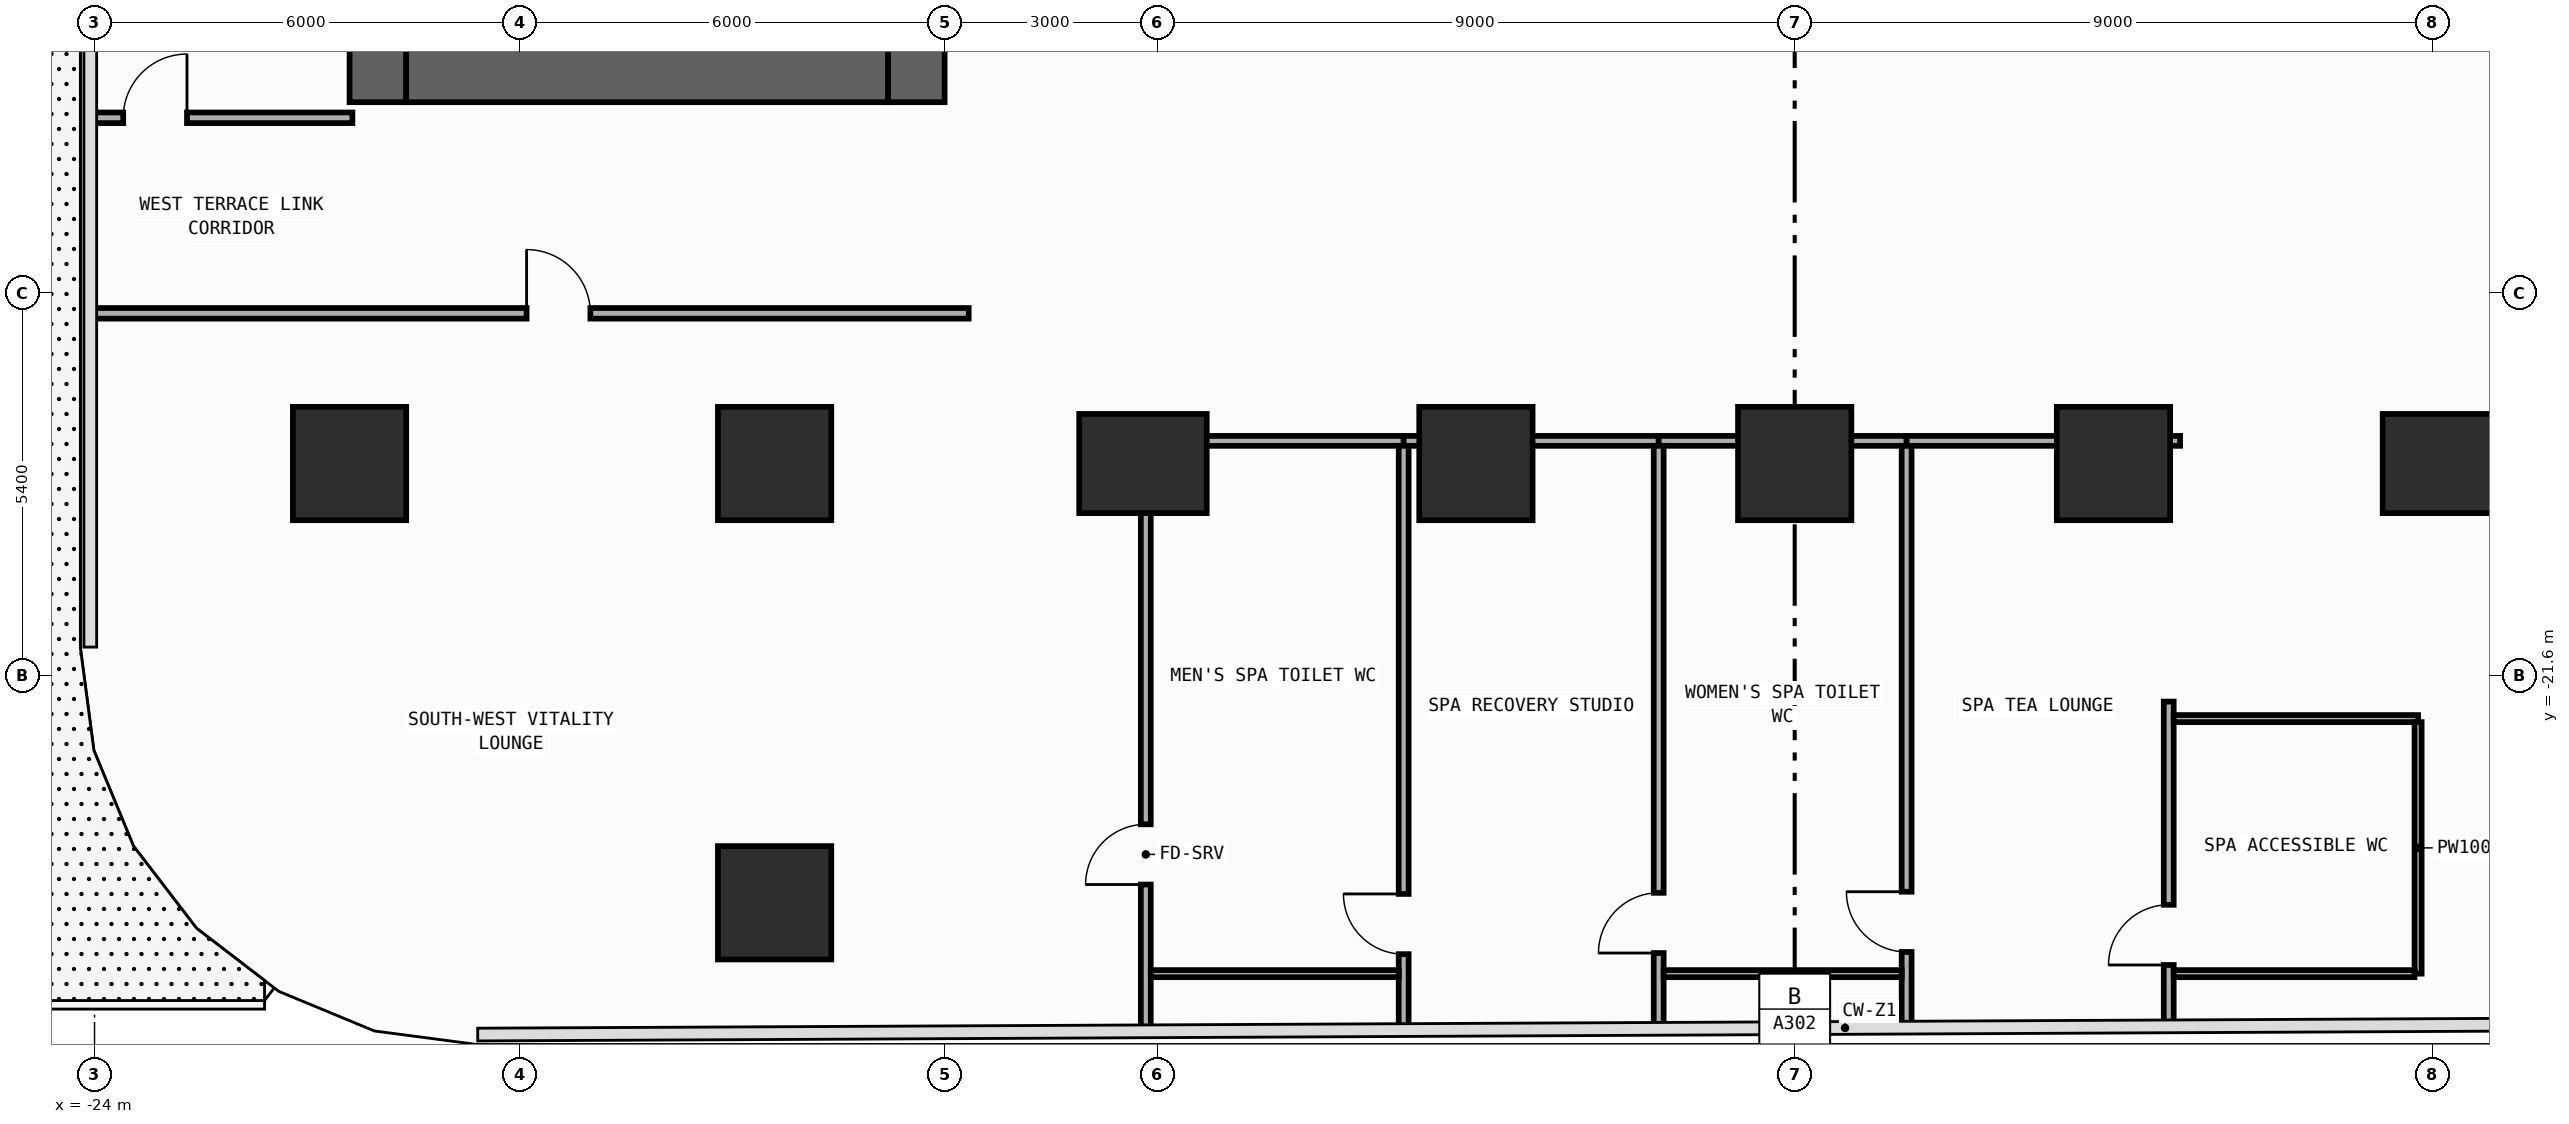
"""IFC4 building model, lengths in metres.
Left out: names, types, materials, properties, quantities, classifications, styles, units other than length and angle.
Written with IfcOpenShell. Run it as: python <this file> out.ifc"""

import sys

from ifc_helpers import new_model, si_unit, direction, frame, frame_2d, origin, origin_2d, place, context, subcontext, project, spatial, rectangle, extrude, element, fill, save


model = new_model("IFC4")
c1 = context("Model", 3, precision=1e-05, world=origin(), true_north=direction((0.0, 1.0)))
c2 = subcontext(c1, "Body", "Model", "MODEL_VIEW")
j1 = project(units=[si_unit("LENGTHUNIT", "METRE"), si_unit("PLANEANGLEUNIT", "RADIAN")], contexts=[c1])
p1 = place(None, origin())
s1 = spatial("IfcSite", under=j1, at=p1, CompositionType="ELEMENT")
p2 = place(p1, origin())
s2 = spatial("IfcBuilding", under=s1, at=p2, CompositionType="ELEMENT")
p3 = place(p2, frame((0.0, 0.0, 21.0)))
s3 = spatial("IfcBuildingStorey", under=s2, at=p3, CompositionType="ELEMENT", Elevation=21.0)
p4 = place(p3, frame((-20.0, -13.5, 0.0), z_axis=(0.0, 0.0, 1.0), x_axis=(0.0, 1.0, 0.0)))
e1 = element("IfcWall", 1, at=p4, inside=s3, PredefinedType="SHEAR", context=c2, shape_type="SweptSolid", body=[
    extrude(rectangle(XDim=27.0, YDim=0.8, at=frame_2d((13.5, 0.0))), origin(), (0.0, 0.0, 1.0), 4.74),
])
p5 = place(p3, frame((-12.4, -13.5, 0.0), z_axis=(0.0, 0.0, 1.0), x_axis=(0.0, 1.0, 0.0)))
e2 = element("IfcWall", 2, at=p5, inside=s3, PredefinedType="SHEAR", context=c2, shape_type="SweptSolid", body=[
    extrude(rectangle(XDim=27.0, YDim=0.8, at=frame_2d((13.5, 0.0))), origin(), (0.0, 0.0, 1.0), 4.74),
])
p6 = place(p5, frame((21.55, 0.0, 0.0)))
e3 = element("IfcOpeningElement", 3, at=p6, cuts=e2, PredefinedType="OPENING", context=c2, shape_type="SweptSolid", body=[
    extrude(rectangle(XDim=1.1, YDim=2.2, at=frame_2d((0.55, 1.1))), frame((0.0, 0.41, 0.0), z_axis=(0.0, -1.0, 0.0), x_axis=(1.0, 0.0, 0.0)), (0.0, 0.0, 1.0), 0.82),
])
p7 = place(p5, frame((18.35, 0.0, 0.0)))
e4 = element("IfcOpeningElement", 4, at=p7, cuts=e2, PredefinedType="OPENING", context=c2, shape_type="SweptSolid", body=[
    extrude(rectangle(XDim=1.1, YDim=2.2, at=frame_2d((0.55, 1.1))), frame((0.0, 0.41, 0.0), z_axis=(0.0, -1.0, 0.0), x_axis=(1.0, 0.0, 0.0)), (0.0, 0.0, 1.0), 0.82),
])
p8 = place(p5, frame((15.15, 0.0, 0.0)))
e5 = element("IfcOpeningElement", 5, at=p8, cuts=e2, PredefinedType="OPENING", context=c2, shape_type="SweptSolid", body=[
    extrude(rectangle(XDim=1.1, YDim=2.2, at=frame_2d((0.55, 1.1))), frame((0.0, 0.41, 0.0), z_axis=(0.0, -1.0, 0.0), x_axis=(1.0, 0.0, 0.0)), (0.0, 0.0, 1.0), 0.82),
])
p9 = place(p5, frame((10.35, 0.0, 0.0)))
e6 = element("IfcOpeningElement", 6, at=p9, cuts=e2, PredefinedType="OPENING", context=c2, shape_type="SweptSolid", body=[
    extrude(rectangle(XDim=1.1, YDim=2.2, at=frame_2d((0.55, 1.1))), frame((0.0, 0.41, 0.0), z_axis=(0.0, -1.0, 0.0), x_axis=(1.0, 0.0, 0.0)), (0.0, 0.0, 1.0), 0.82),
])
p10 = place(p5, frame((7.15, 0.0, 0.0)))
e7 = element("IfcOpeningElement", 7, at=p10, cuts=e2, PredefinedType="OPENING", context=c2, shape_type="SweptSolid", body=[
    extrude(rectangle(XDim=1.1, YDim=2.2, at=frame_2d((0.55, 1.1))), frame((0.0, 0.41, 0.0), z_axis=(0.0, -1.0, 0.0), x_axis=(1.0, 0.0, 0.0)), (0.0, 0.0, 1.0), 0.82),
])
p11 = place(p5, frame((3.95, 0.0, 0.0)))
e8 = element("IfcOpeningElement", 8, at=p11, cuts=e2, PredefinedType="OPENING", context=c2, shape_type="SweptSolid", body=[
    extrude(rectangle(XDim=1.1, YDim=2.2, at=frame_2d((0.55, 1.1))), frame((0.0, 0.41, 0.0), z_axis=(0.0, -1.0, 0.0), x_axis=(1.0, 0.0, 0.0)), (0.0, 0.0, 1.0), 0.82),
])
p12 = place(p5, frame((12.725, 0.0, 0.0)))
e9 = element("IfcOpeningElement", 9, at=p12, cuts=e2, PredefinedType="OPENING", context=c2, shape_type="SweptSolid", body=[
    extrude(rectangle(XDim=1.15, YDim=2.2, at=frame_2d((0.575, 1.1))), frame((0.0, 0.41, 0.0), z_axis=(0.0, -1.0, 0.0), x_axis=(1.0, 0.0, 0.0)), (0.0, 0.0, 1.0), 0.82),
])
p13 = place(p5, frame((1.625, 0.0, 0.0)))
e10 = element("IfcOpeningElement", 10, at=p13, cuts=e2, PredefinedType="OPENING", context=c2, shape_type="SweptSolid", body=[
    extrude(rectangle(XDim=0.85, YDim=2.1, at=frame_2d((0.425, 1.05))), frame((0.0, 0.41, 0.0), z_axis=(0.0, -1.0, 0.0), x_axis=(1.0, 0.0, 0.0)), (0.0, 0.0, 1.0), 0.82),
])
p14 = place(p3, frame((-19.6, -13.1, 0.0), z_axis=(0.0, 0.0, 1.0), x_axis=(1.0, 0.0, 0.0)))
e11 = element("IfcWall", 11, at=p14, inside=s3, PredefinedType="SHEAR", context=c2, shape_type="SweptSolid", body=[
    extrude(rectangle(XDim=6.8, YDim=0.8, at=frame_2d((3.4, 0.0))), origin(), (0.0, 0.0, 1.0), 4.74),
])
for number, where, z_axis, x_axis in (
    (12, (-9.2, -18.6, 0.0), (0.0, 0.0, 1.0), (1.0, 0.0, 0.0)),
    (13, (9.2, -18.6, 0.0), (0.0, 0.0, 1.0), (1.0, 0.0, 0.0)),
):
    element("IfcColumn", number, at=place(p3, frame(where, z_axis=z_axis, x_axis=x_axis)), inside=s3, PredefinedType="COLUMN", context=c2, shape_type="SweptSolid", body=[
        extrude(rectangle(XDim=1.8, YDim=1.4, at=origin_2d()), origin(), (0.0, 0.0, 1.0), 5.0),
    ])
for number, where, z_axis, x_axis in (
    (14, (-20.4, -18.6, 0.0), (0.0, 0.0, 1.0), (1.0, 0.0, 0.0)),
    (15, (-14.4, -18.6, 0.0), (0.0, 0.0, 1.0), (1.0, 0.0, 0.0)),
    (16, (-4.5, -18.6, 0.0), (0.0, 0.0, 1.0), (1.0, 0.0, 0.0)),
    (17, (0.0, -18.6, 0.0), (0.0, 0.0, 1.0), (1.0, 0.0, 0.0)),
    (18, (4.5, -18.6, 0.0), (0.0, 0.0, 1.0), (1.0, 0.0, 0.0)),
    (19, (-14.4, -24.8, 0.0), (0.0, 0.0, 1.0), (1.0, 0.0, 0.0)),
):
    element("IfcColumn", number, at=place(p3, frame(where, z_axis=z_axis, x_axis=x_axis)), inside=s3, PredefinedType="COLUMN", context=c2, shape_type="SweptSolid", body=[
        extrude(rectangle(XDim=1.6, YDim=1.6, at=origin_2d()), origin(), (0.0, 0.0, 1.0), 5.0),
    ])
p15 = place(p3, frame((-24.055, -13.72, 0.0), z_axis=(0.0, 0.0, 1.0), x_axis=(1.0, 0.0, 0.0)))
e20 = element("IfcWall", 20, at=p15, inside=s3, PredefinedType="PARTITIONING", context=c2, shape_type="SweptSolid", body=[
    extrude(rectangle(XDim=3.695, YDim=0.15, at=frame_2d((1.847, 0.0))), origin(), (0.0, 0.0, 1.0), 4.74),
])
p16 = place(p15, frame((0.46, 0.0, 0.0)))
e21 = element("IfcOpeningElement", 21, at=p16, cuts=e20, PredefinedType="OPENING", context=c2, shape_type="SweptSolid", body=[
    extrude(rectangle(XDim=0.9, YDim=2.15, at=frame_2d((0.45, 1.075))), frame((0.0, 0.085, 0.0), z_axis=(0.0, -1.0, 0.0), x_axis=(1.0, 0.0, 0.0)), (0.0, 0.0, 1.0), 0.17),
])
p17 = place(p3, frame((-24.055, -16.48, 0.0), z_axis=(0.0, 0.0, 1.0), x_axis=(1.0, 0.0, 0.0)))
e22 = element("IfcWall", 22, at=p17, inside=s3, PredefinedType="PARTITIONING", context=c2, shape_type="SweptSolid", body=[
    extrude(rectangle(XDim=12.395, YDim=0.15, at=frame_2d((6.198, 0.0))), origin(), (0.0, 0.0, 1.0), 4.74),
])
p18 = place(p17, frame((6.154, 0.0, 0.0)))
e23 = element("IfcOpeningElement", 23, at=p18, cuts=e22, PredefinedType="OPENING", context=c2, shape_type="SweptSolid", body=[
    extrude(rectangle(XDim=0.9, YDim=2.15, at=frame_2d((0.45, 1.075))), frame((0.0, 0.085, 0.0), z_axis=(0.0, -1.0, 0.0), x_axis=(1.0, 0.0, 0.0)), (0.0, 0.0, 1.0), 0.17),
])
p19 = place(p3, frame((-9.16, -26.609, 0.0), z_axis=(0.0, 0.0, 1.0), x_axis=(0.0, 1.0, 0.0)))
e24 = element("IfcWall", 24, at=p19, inside=s3, PredefinedType="PARTITIONING", context=c2, shape_type="SweptSolid", body=[
    extrude(rectangle(XDim=8.399, YDim=0.14, at=frame_2d((4.2, 0.0))), origin(), (0.0, 0.0, 1.0), 3.94),
])
p20 = place(p19, frame((2.067, 0.0, 0.0)))
e25 = element("IfcOpeningElement", 25, at=p20, cuts=e24, PredefinedType="OPENING", context=c2, shape_type="SweptSolid", body=[
    extrude(rectangle(XDim=0.85, YDim=2.1, at=frame_2d((0.425, 1.05))), frame((0.0, 0.08, 0.0), z_axis=(0.0, -1.0, 0.0), x_axis=(1.0, 0.0, 0.0)), (0.0, 0.0, 1.0), 0.16),
])
p21 = place(p3, frame((-9.09, -18.28, 0.0), z_axis=(0.0, 0.0, 1.0), x_axis=(1.0, 0.0, 0.0)))
e26 = element("IfcWall", 26, at=p21, inside=s3, PredefinedType="PARTITIONING", context=c2, shape_type="SweptSolid", body=[
    extrude(rectangle(XDim=3.57, YDim=0.14, at=frame_2d((1.785, 0.0))), origin(), (0.0, 0.0, 1.0), 3.94),
])
p22 = place(p3, frame((-5.52, -18.28, 0.0), z_axis=(0.0, 0.0, 1.0), x_axis=(1.0, 0.0, 0.0)))
e27 = element("IfcWall", 27, at=p22, inside=s3, PredefinedType="PARTITIONING", context=c2, shape_type="SweptSolid", body=[
    extrude(rectangle(XDim=3.6, YDim=0.14, at=frame_2d((1.8, 0.0))), origin(), (0.0, 0.0, 1.0), 3.94),
])
p23 = place(p3, frame((-1.92, -18.28, 0.0), z_axis=(0.0, 0.0, 1.0), x_axis=(1.0, 0.0, 0.0)))
e28 = element("IfcWall", 28, at=p23, inside=s3, PredefinedType="PARTITIONING", context=c2, shape_type="SweptSolid", body=[
    extrude(rectangle(XDim=3.5, YDim=0.14, at=frame_2d((1.75, 0.0))), origin(), (0.0, 0.0, 1.0), 3.94),
])
p24 = place(p3, frame((1.58, -18.28, 0.0), z_axis=(0.0, 0.0, 1.0), x_axis=(1.0, 0.0, 0.0)))
e29 = element("IfcWall", 29, at=p24, inside=s3, PredefinedType="PARTITIONING", context=c2, shape_type="SweptSolid", body=[
    extrude(rectangle(XDim=3.86, YDim=0.14, at=frame_2d((1.93, 0.0))), origin(), (0.0, 0.0, 1.0), 3.94),
])
p25 = place(p3, frame((-5.52, -26.592, 0.0), z_axis=(0.0, 0.0, 1.0), x_axis=(0.0, 1.0, 0.0)))
e30 = element("IfcWall", 30, at=p25, inside=s3, PredefinedType="PARTITIONING", context=c2, shape_type="SweptSolid", body=[
    extrude(rectangle(XDim=8.241, YDim=0.14, at=frame_2d((4.121, 0.0))), origin(), (0.0, 0.0, 1.0), 4.74),
])
p26 = place(p25, frame((1.067, 0.0, 0.0)))
e31 = element("IfcOpeningElement", 31, at=p26, cuts=e30, PredefinedType="OPENING", context=c2, shape_type="SweptSolid", body=[
    extrude(rectangle(XDim=0.85, YDim=2.1, at=frame_2d((0.425, 1.05))), frame((0.0, 0.08, 0.0), z_axis=(0.0, -1.0, 0.0), x_axis=(1.0, 0.0, 0.0)), (0.0, 0.0, 1.0), 0.16),
])
p27 = place(p3, frame((-1.92, -26.574, 0.0), z_axis=(0.0, 0.0, 1.0), x_axis=(0.0, 1.0, 0.0)))
e32 = element("IfcWall", 32, at=p27, inside=s3, PredefinedType="PARTITIONING", context=c2, shape_type="SweptSolid", body=[
    extrude(rectangle(XDim=8.224, YDim=0.14, at=frame_2d((4.112, 0.0))), origin(), (0.0, 0.0, 1.0), 4.74),
])
p28 = place(p27, frame((1.065, 0.0, 0.0)))
e33 = element("IfcOpeningElement", 33, at=p28, cuts=e32, PredefinedType="OPENING", context=c2, shape_type="SweptSolid", body=[
    extrude(rectangle(XDim=0.85, YDim=2.1, at=frame_2d((0.425, 1.05))), frame((0.0, 0.08, 0.0), z_axis=(0.0, -1.0, 0.0), x_axis=(1.0, 0.0, 0.0)), (0.0, 0.0, 1.0), 0.16),
])
p29 = place(p3, frame((1.58, -26.557, 0.0), z_axis=(0.0, 0.0, 1.0), x_axis=(0.0, 1.0, 0.0)))
e34 = element("IfcWall", 34, at=p29, inside=s3, PredefinedType="PARTITIONING", context=c2, shape_type="SweptSolid", body=[
    extrude(rectangle(XDim=8.207, YDim=0.14, at=frame_2d((4.104, 0.0))), origin(), (0.0, 0.0, 1.0), 4.74),
])
p30 = place(p29, frame((1.063, 0.0, 0.0)))
e35 = element("IfcOpeningElement", 35, at=p30, cuts=e34, PredefinedType="OPENING", context=c2, shape_type="SweptSolid", body=[
    extrude(rectangle(XDim=0.85, YDim=2.1, at=frame_2d((0.425, 1.05))), frame((0.0, 0.08, 0.0), z_axis=(0.0, -1.0, 0.0), x_axis=(1.0, 0.0, 0.0)), (0.0, 0.0, 1.0), 0.16),
])
p31 = place(p3, frame((5.28, -26.539, 0.0), z_axis=(0.0, 0.0, 1.0), x_axis=(0.0, 1.0, 0.0)))
e36 = element("IfcWall", 36, at=p31, inside=s3, PredefinedType="PARTITIONING", context=c2, shape_type="SweptSolid", body=[
    extrude(rectangle(XDim=4.579, YDim=0.14, at=frame_2d((2.29, 0.0))), origin(), (0.0, 0.0, 1.0), 4.74),
])
p32 = place(p31, frame((0.861, 0.0, 0.0)))
e37 = element("IfcOpeningElement", 37, at=p32, cuts=e36, PredefinedType="OPENING", context=c2, shape_type="SweptSolid", body=[
    extrude(rectangle(XDim=0.85, YDim=2.1, at=frame_2d((0.425, 1.05))), frame((0.0, 0.08, 0.0), z_axis=(0.0, -1.0, 0.0), x_axis=(1.0, 0.0, 0.0)), (0.0, 0.0, 1.0), 0.16),
])
p33 = place(p3, frame((-5.59, -25.8, 0.0), z_axis=(0.0, 0.0, 1.0), x_axis=(-1.0, 0.0, 0.0)))
e38 = element("IfcWall", 38, at=p33, inside=s3, PredefinedType="PARTITIONING", context=c2, shape_type="SweptSolid", body=[
    extrude(rectangle(XDim=3.5, YDim=0.1, at=frame_2d((1.75, 0.0))), origin(), (0.0, 0.0, 1.0), 4.74),
])
p34 = place(p3, frame((1.51, -25.8, 0.0), z_axis=(0.0, 0.0, 1.0), x_axis=(-1.0, 0.0, 0.0)))
e39 = element("IfcWall", 39, at=p34, inside=s3, PredefinedType="PARTITIONING", context=c2, shape_type="SweptSolid", body=[
    extrude(rectangle(XDim=3.36, YDim=0.1, at=frame_2d((1.68, 0.0))), origin(), (0.0, 0.0, 1.0), 4.74),
])
p35 = place(p3, frame((5.35, -22.2, 0.0), z_axis=(0.0, 0.0, 1.0), x_axis=(1.0, 0.0, 0.0)))
e40 = element("IfcWall", 40, at=p35, inside=s3, PredefinedType="PARTITIONING", context=c2, shape_type="SweptSolid", body=[
    extrude(rectangle(XDim=3.45, YDim=0.1, at=frame_2d((1.725, 0.0))), origin(), (0.0, 0.0, 1.0), 4.74),
])
p36 = place(p3, frame((8.8, -22.25, 0.0), z_axis=(0.0, 0.0, 1.0), x_axis=(0.0, -1.0, 0.0)))
e41 = element("IfcWall", 41, at=p36, inside=s3, PredefinedType="PARTITIONING", context=c2, shape_type="SweptSolid", body=[
    extrude(rectangle(XDim=3.55, YDim=0.1, at=frame_2d((1.775, 0.0))), origin(), (0.0, 0.0, 1.0), 4.74),
])
p37 = place(p3, frame((8.75, -25.8, 0.0), z_axis=(0.0, 0.0, 1.0), x_axis=(-1.0, 0.0, 0.0)))
e42 = element("IfcWall", 42, at=p37, inside=s3, PredefinedType="PARTITIONING", context=c2, shape_type="SweptSolid", body=[
    extrude(rectangle(XDim=3.4, YDim=0.1, at=frame_2d((1.7, 0.0))), origin(), (0.0, 0.0, 1.0), 4.74),
])
p38 = place(p16, origin())
e43 = element("IfcDoor", 43, at=p38, inside=s3, OperationType="SINGLE_SWING_RIGHT", PredefinedType="DOOR", context=c2, shape_type="SweptSolid", body=[
    extrude(rectangle(XDim=0.9, YDim=2.15, at=frame_2d((0.45, 1.075))), frame((0.0, 0.025, 0.0), z_axis=(0.0, -1.0, 0.0), x_axis=(1.0, 0.0, 0.0)), (0.0, 0.0, 1.0), 0.05),
])
fill(e21, e43)
p39 = place(p18, origin())
e44 = element("IfcDoor", 44, at=p39, inside=s3, OperationType="SINGLE_SWING_LEFT", PredefinedType="DOOR", context=c2, shape_type="SweptSolid", body=[
    extrude(rectangle(XDim=0.9, YDim=2.15, at=frame_2d((0.45, 1.075))), frame((0.0, 0.025, 0.0), z_axis=(0.0, -1.0, 0.0), x_axis=(1.0, 0.0, 0.0)), (0.0, 0.0, 1.0), 0.05),
])
fill(e23, e44)
p40 = place(p20, origin())
e45 = element("IfcDoor", 45, at=p40, inside=s3, OperationType="SINGLE_SWING_LEFT", PredefinedType="DOOR", context=c2, shape_type="SweptSolid", body=[
    extrude(rectangle(XDim=0.85, YDim=2.1, at=frame_2d((0.425, 1.05))), frame((0.0, 0.025, 0.0), z_axis=(0.0, -1.0, 0.0), x_axis=(1.0, 0.0, 0.0)), (0.0, 0.0, 1.0), 0.05),
])
fill(e25, e45)
p41 = place(p26, origin())
e46 = element("IfcDoor", 46, at=p41, inside=s3, OperationType="SINGLE_SWING_RIGHT", PredefinedType="DOOR", context=c2, shape_type="SweptSolid", body=[
    extrude(rectangle(XDim=0.85, YDim=2.1, at=frame_2d((0.425, 1.05))), frame((0.0, 0.025, 0.0), z_axis=(0.0, -1.0, 0.0), x_axis=(1.0, 0.0, 0.0)), (0.0, 0.0, 1.0), 0.05),
])
fill(e31, e46)
p42 = place(p28, origin())
e47 = element("IfcDoor", 47, at=p42, inside=s3, OperationType="SINGLE_SWING_LEFT", PredefinedType="DOOR", context=c2, shape_type="SweptSolid", body=[
    extrude(rectangle(XDim=0.85, YDim=2.1, at=frame_2d((0.425, 1.05))), frame((0.0, 0.025, 0.0), z_axis=(0.0, -1.0, 0.0), x_axis=(1.0, 0.0, 0.0)), (0.0, 0.0, 1.0), 0.05),
])
fill(e33, e47)
p43 = place(p30, origin())
e48 = element("IfcDoor", 48, at=p43, inside=s3, OperationType="SINGLE_SWING_RIGHT", PredefinedType="DOOR", context=c2, shape_type="SweptSolid", body=[
    extrude(rectangle(XDim=0.85, YDim=2.1, at=frame_2d((0.425, 1.05))), frame((0.0, 0.025, 0.0), z_axis=(0.0, -1.0, 0.0), x_axis=(1.0, 0.0, 0.0)), (0.0, 0.0, 1.0), 0.05),
])
fill(e35, e48)
p44 = place(p32, origin())
e49 = element("IfcDoor", 49, at=p44, inside=s3, OperationType="SINGLE_SWING_LEFT", PredefinedType="DOOR", context=c2, shape_type="SweptSolid", body=[
    extrude(rectangle(XDim=0.85, YDim=2.1, at=frame_2d((0.425, 1.05))), frame((0.0, 0.025, 0.0), z_axis=(0.0, -1.0, 0.0), x_axis=(1.0, 0.0, 0.0)), (0.0, 0.0, 1.0), 0.05),
])
fill(e37, e49)
save(model, sys.argv[1])
